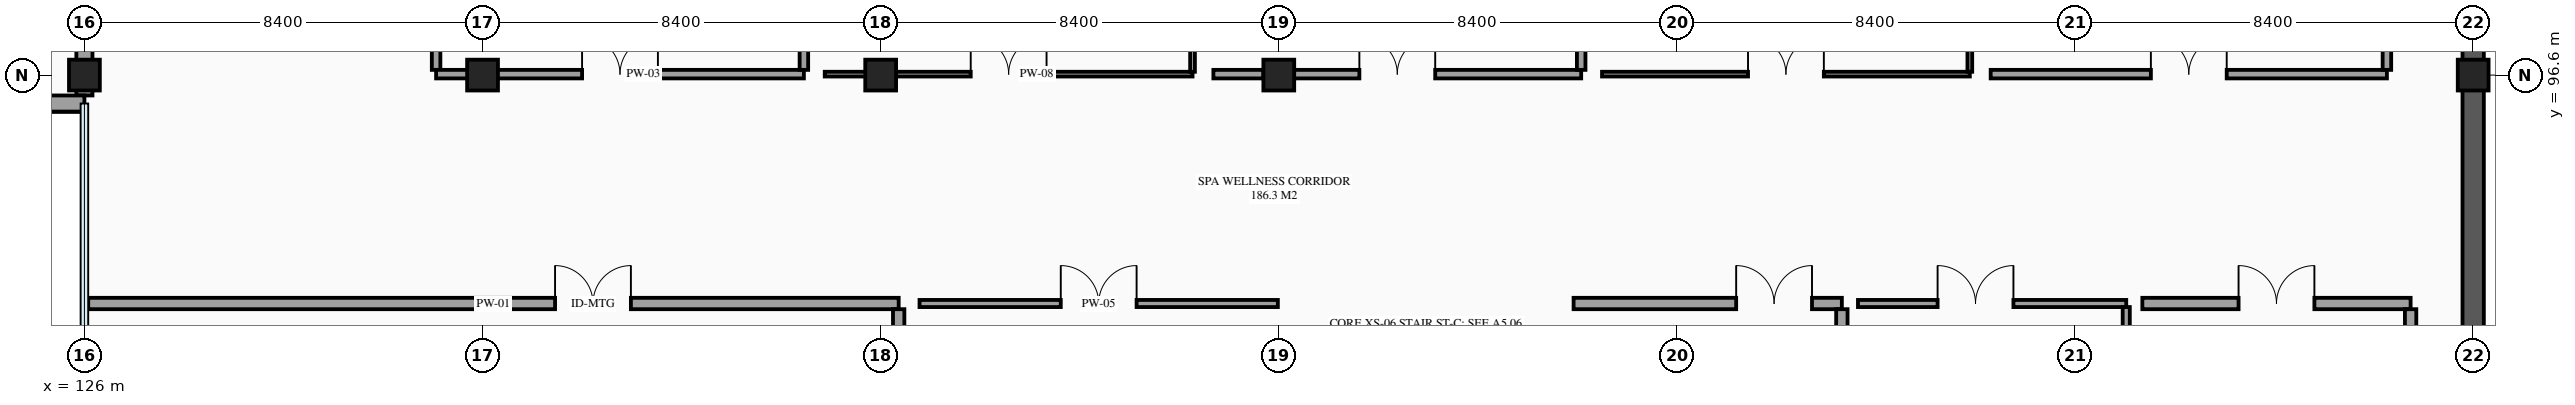
"""IFC4 building model, lengths in metres.
Left out: names, types, materials, properties, quantities, classifications, styles, units other than length and angle.
Written with IfcOpenShell. Run it as: python <this file> out.ifc"""

import sys

from ifc_helpers import new_model, si_unit, direction, frame, frame_2d, origin, origin_2d, place, context, subcontext, project, spatial, rectangle, extrude, element, fill, save


model = new_model("IFC4")
c1 = context("Model", 3, precision=1e-05, world=origin(), true_north=direction((0.0, 1.0)))
c2 = subcontext(c1, "Body", "Model", "MODEL_VIEW")
j1 = project(units=[si_unit("LENGTHUNIT", "METRE"), si_unit("PLANEANGLEUNIT", "RADIAN")], contexts=[c1])
p1 = place(None, origin())
s1 = spatial("IfcSite", under=j1, at=p1, CompositionType="ELEMENT")
p2 = place(p1, origin())
s2 = spatial("IfcBuilding", under=s1, at=p2, CompositionType="ELEMENT")
p3 = place(p2, frame((0.0, 0.0, 5.4)))
s3 = spatial("IfcBuildingStorey", under=s2, at=p3, CompositionType="ELEMENT", Elevation=5.4)
for number, where, z_axis, x_axis in (
    (1, (126.0, 96.6, 0.0), (0.0, 0.0, 1.0), (1.0, 0.0, 0.0)),
    (2, (134.4, 96.6, 0.0), (0.0, 0.0, 1.0), (1.0, 0.0, 0.0)),
    (3, (142.8, 96.6, 0.0), (0.0, 0.0, 1.0), (1.0, 0.0, 0.0)),
    (4, (151.2, 96.6, 0.0), (0.0, 0.0, 1.0), (1.0, 0.0, 0.0)),
    (5, (176.4, 96.6, 0.0), (0.0, 0.0, 1.0), (1.0, 0.0, 0.0)),
):
    element("IfcColumn", number, at=place(p3, frame(where, z_axis=z_axis, x_axis=x_axis)), inside=s3, PredefinedType="COLUMN", context=c2, shape_type="SweptSolid", body=[
        extrude(rectangle(XDim=0.65, YDim=0.65, at=origin_2d()), origin(), (0.0, 0.0, 1.0), 4.5),
    ])
p4 = place(p3, frame((176.4, 88.2, 0.0), z_axis=(0.0, 0.0, 1.0), x_axis=(0.0, 1.0, 0.0)))
e6 = element("IfcWall", 6, at=p4, inside=s3, PredefinedType="STANDARD", context=c2, shape_type="SweptSolid", body=[
    extrude(rectangle(XDim=8.4, YDim=0.45, at=frame_2d((4.2, 0.0))), origin(), (0.0, 0.0, 1.0), 4.5),
])
p5 = place(p3, frame((176.4, 96.6, 0.0), z_axis=(0.0, 0.0, 1.0), x_axis=(0.0, 1.0, 0.0)))
e7 = element("IfcWall", 7, at=p5, inside=s3, PredefinedType="STANDARD", context=c2, shape_type="SweptSolid", body=[
    extrude(rectangle(XDim=8.4, YDim=0.45, at=frame_2d((4.2, 0.0))), origin(), (0.0, 0.0, 1.0), 4.5),
])
p6 = place(p3, frame((126.0, 96.6, 0.0), z_axis=(0.0, 0.0, 1.0), x_axis=(0.0, -1.0, 0.0)))
e8 = element("IfcWall", 8, at=p6, inside=s3, PredefinedType="STANDARD", context=c2, shape_type="SweptSolid", body=[
    extrude(rectangle(XDim=0.43, YDim=0.34, at=frame_2d((0.215, 0.0))), origin(), (0.0, 0.0, 1.0), 4.5),
])
p7 = place(p3, frame((126.0, 97.2, 0.0), z_axis=(0.0, 0.0, 1.0), x_axis=(0.0, -1.0, 0.0)))
e9 = element("IfcWall", 9, at=p7, inside=s3, PredefinedType="STANDARD", context=c2, shape_type="SweptSolid", body=[
    extrude(rectangle(XDim=0.6, YDim=0.34, at=frame_2d((0.3, 0.0))), origin(), (0.0, 0.0, 1.0), 4.5),
])
p8 = place(p3, frame((58.8, 96.0, 0.0), z_axis=(0.0, 0.0, 1.0), x_axis=(1.0, 0.0, 0.0)))
e10 = element("IfcWall", 10, at=p8, inside=s3, PredefinedType="STANDARD", context=c2, shape_type="SweptSolid", body=[
    extrude(rectangle(XDim=67.2, YDim=0.34, at=frame_2d((33.6, 0.0))), origin(), (0.0, 0.0, 1.0), 4.5),
])
p9 = place(p3, frame((126.08, 91.78, 0.0), z_axis=(0.0, 0.0, 1.0), x_axis=(1.0, 0.0, 0.0)))
e11 = element("IfcWall", 11, at=p9, inside=s3, PredefinedType="PARTITIONING", context=c2, shape_type="SweptSolid", body=[
    extrude(rectangle(XDim=17.1, YDim=0.24, at=frame_2d((8.55, 0.0))), origin(), (0.0, 0.0, 1.0), 4.235),
])
p10 = place(p9, frame((9.85, 0.0, 0.0)))
e12 = element("IfcOpeningElement", 12, at=p10, cuts=e11, PredefinedType="OPENING", context=c2, shape_type="SweptSolid", body=[
    extrude(rectangle(XDim=1.6, YDim=2.25, at=frame_2d((0.8, 1.125))), frame((0.0, 0.13, 0.0), z_axis=(0.0, -1.0, 0.0), x_axis=(1.0, 0.0, 0.0)), (0.0, 0.0, 1.0), 0.26),
])
p11 = place(p3, frame((143.18, 80.42, 0.0), z_axis=(0.0, 0.0, 1.0), x_axis=(0.0, 1.0, 0.0)))
e13 = element("IfcWall", 13, at=p11, inside=s3, PredefinedType="PARTITIONING", context=c2, shape_type="SweptSolid", body=[
    extrude(rectangle(XDim=11.24, YDim=0.24, at=frame_2d((5.62, 0.0))), origin(), (0.0, 0.0, 1.0), 4.235),
])
p12 = place(p3, frame((134.4, 96.62, 0.0), z_axis=(0.0, 0.0, 1.0), x_axis=(1.0, 0.0, 0.0)))
e14 = element("IfcWall", 14, at=p12, inside=s3, PredefinedType="PARTITIONING", context=c2, shape_type="SweptSolid", body=[
    extrude(rectangle(XDim=6.78, YDim=0.18, at=frame_2d((3.39, 0.0))), origin(), (0.0, 0.0, 1.0), 3.83),
])
p13 = place(p12, frame((2.1, 0.0, 0.0)))
e15 = element("IfcOpeningElement", 15, at=p13, cuts=e14, PredefinedType="OPENING", context=c2, shape_type="SweptSolid", body=[
    extrude(rectangle(XDim=1.6, YDim=2.25, at=frame_2d((0.8, 1.125))), frame((0.0, 0.1, 0.0), z_axis=(0.0, -1.0, 0.0), x_axis=(1.0, 0.0, 0.0)), (0.0, 0.0, 1.0), 0.2),
])
for number, where, z_axis, x_axis in (
    (16, (133.42, 96.71, 0.0), (0.0, 0.0, 1.0), (0.0, 1.0, 0.0)),
    (17, (141.18, 96.71, 0.0), (0.0, 0.0, 1.0), (0.0, 1.0, 0.0)),
):
    element("IfcWall", number, at=place(p3, frame(where, z_axis=z_axis, x_axis=x_axis)), inside=s3, PredefinedType="PARTITIONING", context=c2, shape_type="SweptSolid", body=[
        extrude(rectangle(XDim=14.47, YDim=0.18, at=frame_2d((7.235, 0.0))), origin(), (0.0, 0.0, 1.0), 4.235),
    ])
p14 = place(p3, frame((143.62, 91.78, 0.0), z_axis=(0.0, 0.0, 1.0), x_axis=(1.0, 0.0, 0.0)))
e18 = element("IfcWall", 18, at=p14, inside=s3, PredefinedType="PARTITIONING", context=c2, shape_type="SweptSolid", body=[
    extrude(rectangle(XDim=7.56, YDim=0.15, at=frame_2d((3.78, 0.0))), origin(), (0.0, 0.0, 1.0), 4.235),
])
p15 = place(p14, frame((2.98, 0.0, 0.0)))
e19 = element("IfcOpeningElement", 19, at=p15, cuts=e18, PredefinedType="OPENING", context=c2, shape_type="SweptSolid", body=[
    extrude(rectangle(XDim=1.6, YDim=2.25, at=frame_2d((0.8, 1.125))), frame((0.0, 0.085, 0.0), z_axis=(0.0, -1.0, 0.0), x_axis=(1.0, 0.0, 0.0)), (0.0, 0.0, 1.0), 0.17),
])
p16 = place(p3, frame((142.8, 96.62, 0.0), z_axis=(0.0, 0.0, 1.0), x_axis=(1.0, 0.0, 0.0)))
e20 = element("IfcWall", 20, at=p16, inside=s3, PredefinedType="PARTITIONING", context=c2, shape_type="SweptSolid", body=[
    extrude(rectangle(XDim=6.58, YDim=0.1, at=frame_2d((3.29, 0.0))), origin(), (0.0, 0.0, 1.0), 3.44),
])
p17 = place(p16, frame((1.9, 0.0, 0.0)))
e21 = element("IfcOpeningElement", 21, at=p17, cuts=e20, PredefinedType="OPENING", context=c2, shape_type="SweptSolid", body=[
    extrude(rectangle(XDim=1.6, YDim=2.25, at=frame_2d((0.8, 1.125))), frame((0.0, 0.06, 0.0), z_axis=(0.0, -1.0, 0.0), x_axis=(1.0, 0.0, 0.0)), (0.0, 0.0, 1.0), 0.12),
])
p18 = place(p3, frame((149.38, 96.67, 0.0), z_axis=(0.0, 0.0, 1.0), x_axis=(0.0, 1.0, 0.0)))
e22 = element("IfcWall", 22, at=p18, inside=s3, PredefinedType="PARTITIONING", context=c2, shape_type="SweptSolid", body=[
    extrude(rectangle(XDim=14.51, YDim=0.1, at=frame_2d((7.255, 0.0))), origin(), (0.0, 0.0, 1.0), 4.235),
])
p19 = place(p3, frame((157.42, 91.78, 0.0), z_axis=(0.0, 0.0, 1.0), x_axis=(1.0, 0.0, 0.0)))
e23 = element("IfcWall", 23, at=p19, inside=s3, PredefinedType="PARTITIONING", context=c2, shape_type="SweptSolid", body=[
    extrude(rectangle(XDim=5.66, YDim=0.24, at=frame_2d((2.83, 0.0))), origin(), (0.0, 0.0, 1.0), 4.235),
])
p20 = place(p19, frame((3.43, 0.0, 0.0)))
e24 = element("IfcOpeningElement", 24, at=p20, cuts=e23, PredefinedType="OPENING", context=c2, shape_type="SweptSolid", body=[
    extrude(rectangle(XDim=1.6, YDim=2.25, at=frame_2d((0.8, 1.125))), frame((0.0, 0.13, 0.0), z_axis=(0.0, -1.0, 0.0), x_axis=(1.0, 0.0, 0.0)), (0.0, 0.0, 1.0), 0.26),
])
p21 = place(p3, frame((163.08, 80.42, 0.0), z_axis=(0.0, 0.0, 1.0), x_axis=(0.0, 1.0, 0.0)))
e25 = element("IfcWall", 25, at=p21, inside=s3, PredefinedType="PARTITIONING", context=c2, shape_type="SweptSolid", body=[
    extrude(rectangle(XDim=11.24, YDim=0.24, at=frame_2d((5.62, 0.0))), origin(), (0.0, 0.0, 1.0), 4.235),
])
p22 = place(p3, frame((150.875, 96.62, 0.0), z_axis=(0.0, 0.0, 1.0), x_axis=(1.0, 0.0, 0.0)))
e26 = element("IfcWall", 26, at=p22, inside=s3, PredefinedType="PARTITIONING", context=c2, shape_type="SweptSolid", body=[
    extrude(rectangle(XDim=6.705, YDim=0.18, at=frame_2d((3.353, 0.0))), origin(), (0.0, 0.0, 1.0), 4.235),
])
p23 = place(p22, frame((2.025, 0.0, 0.0)))
e27 = element("IfcOpeningElement", 27, at=p23, cuts=e26, PredefinedType="OPENING", context=c2, shape_type="SweptSolid", body=[
    extrude(rectangle(XDim=1.6, YDim=2.25, at=frame_2d((0.8, 1.125))), frame((0.0, 0.1, 0.0), z_axis=(0.0, -1.0, 0.0), x_axis=(1.0, 0.0, 0.0)), (0.0, 0.0, 1.0), 0.2),
])
p24 = place(p3, frame((157.58, 96.71, 0.0), z_axis=(0.0, 0.0, 1.0), x_axis=(0.0, 1.0, 0.0)))
e28 = element("IfcWall", 28, at=p24, inside=s3, PredefinedType="PARTITIONING", context=c2, shape_type="SweptSolid", body=[
    extrude(rectangle(XDim=14.47, YDim=0.18, at=frame_2d((7.235, 0.0))), origin(), (0.0, 0.0, 1.0), 4.235),
])
p25 = place(p3, frame((163.42, 91.78, 0.0), z_axis=(0.0, 0.0, 1.0), x_axis=(1.0, 0.0, 0.0)))
e29 = element("IfcWall", 29, at=p25, inside=s3, PredefinedType="PARTITIONING", context=c2, shape_type="SweptSolid", body=[
    extrude(rectangle(XDim=5.66, YDim=0.15, at=frame_2d((2.83, 0.0))), origin(), (0.0, 0.0, 1.0), 4.235),
])
p26 = place(p25, frame((1.68, 0.0, 0.0)))
e30 = element("IfcOpeningElement", 30, at=p26, cuts=e29, PredefinedType="OPENING", context=c2, shape_type="SweptSolid", body=[
    extrude(rectangle(XDim=1.6, YDim=2.25, at=frame_2d((0.8, 1.125))), frame((0.0, 0.085, 0.0), z_axis=(0.0, -1.0, 0.0), x_axis=(1.0, 0.0, 0.0)), (0.0, 0.0, 1.0), 0.17),
])
p27 = place(p3, frame((169.08, 80.42, 0.0), z_axis=(0.0, 0.0, 1.0), x_axis=(0.0, 1.0, 0.0)))
e31 = element("IfcWall", 31, at=p27, inside=s3, PredefinedType="PARTITIONING", context=c2, shape_type="SweptSolid", body=[
    extrude(rectangle(XDim=11.285, YDim=0.15, at=frame_2d((5.643, 0.0))), origin(), (0.0, 0.0, 1.0), 4.235),
])
p28 = place(p3, frame((158.02, 96.62, 0.0), z_axis=(0.0, 0.0, 1.0), x_axis=(1.0, 0.0, 0.0)))
e32 = element("IfcWall", 32, at=p28, inside=s3, PredefinedType="PARTITIONING", context=c2, shape_type="SweptSolid", body=[
    extrude(rectangle(XDim=7.76, YDim=0.1, at=frame_2d((3.88, 0.0))), origin(), (0.0, 0.0, 1.0), 4.235),
])
p29 = place(p28, frame((3.08, 0.0, 0.0)))
e33 = element("IfcOpeningElement", 33, at=p29, cuts=e32, PredefinedType="OPENING", context=c2, shape_type="SweptSolid", body=[
    extrude(rectangle(XDim=1.6, YDim=2.25, at=frame_2d((0.8, 1.125))), frame((0.0, 0.06, 0.0), z_axis=(0.0, -1.0, 0.0), x_axis=(1.0, 0.0, 0.0)), (0.0, 0.0, 1.0), 0.12),
])
p30 = place(p3, frame((165.78, 96.67, 0.0), z_axis=(0.0, 0.0, 1.0), x_axis=(0.0, 1.0, 0.0)))
e34 = element("IfcWall", 34, at=p30, inside=s3, PredefinedType="PARTITIONING", context=c2, shape_type="SweptSolid", body=[
    extrude(rectangle(XDim=14.51, YDim=0.1, at=frame_2d((7.255, 0.0))), origin(), (0.0, 0.0, 1.0), 4.235),
])
p31 = place(p3, frame((169.42, 91.78, 0.0), z_axis=(0.0, 0.0, 1.0), x_axis=(1.0, 0.0, 0.0)))
e35 = element("IfcWall", 35, at=p31, inside=s3, PredefinedType="PARTITIONING", context=c2, shape_type="SweptSolid", body=[
    extrude(rectangle(XDim=5.66, YDim=0.24, at=frame_2d((2.83, 0.0))), origin(), (0.0, 0.0, 1.0), 4.235),
])
p32 = place(p31, frame((2.03, 0.0, 0.0)))
e36 = element("IfcOpeningElement", 36, at=p32, cuts=e35, PredefinedType="OPENING", context=c2, shape_type="SweptSolid", body=[
    extrude(rectangle(XDim=1.6, YDim=2.25, at=frame_2d((0.8, 1.125))), frame((0.0, 0.13, 0.0), z_axis=(0.0, -1.0, 0.0), x_axis=(1.0, 0.0, 0.0)), (0.0, 0.0, 1.0), 0.26),
])
p33 = place(p3, frame((175.08, 80.42, 0.0), z_axis=(0.0, 0.0, 1.0), x_axis=(0.0, 1.0, 0.0)))
e37 = element("IfcWall", 37, at=p33, inside=s3, PredefinedType="PARTITIONING", context=c2, shape_type="SweptSolid", body=[
    extrude(rectangle(XDim=11.24, YDim=0.24, at=frame_2d((5.62, 0.0))), origin(), (0.0, 0.0, 1.0), 4.235),
])
p34 = place(p3, frame((166.22, 96.62, 0.0), z_axis=(0.0, 0.0, 1.0), x_axis=(1.0, 0.0, 0.0)))
e38 = element("IfcWall", 38, at=p34, inside=s3, PredefinedType="PARTITIONING", context=c2, shape_type="SweptSolid", body=[
    extrude(rectangle(XDim=8.36, YDim=0.18, at=frame_2d((4.18, 0.0))), origin(), (0.0, 0.0, 1.0), 4.235),
])
p35 = place(p34, frame((3.38, 0.0, 0.0)))
e39 = element("IfcOpeningElement", 39, at=p35, cuts=e38, PredefinedType="OPENING", context=c2, shape_type="SweptSolid", body=[
    extrude(rectangle(XDim=1.6, YDim=2.25, at=frame_2d((0.8, 1.125))), frame((0.0, 0.1, 0.0), z_axis=(0.0, -1.0, 0.0), x_axis=(1.0, 0.0, 0.0)), (0.0, 0.0, 1.0), 0.2),
])
p36 = place(p3, frame((174.58, 96.71, 0.0), z_axis=(0.0, 0.0, 1.0), x_axis=(0.0, 1.0, 0.0)))
e40 = element("IfcWall", 40, at=p36, inside=s3, PredefinedType="PARTITIONING", context=c2, shape_type="SweptSolid", body=[
    extrude(rectangle(XDim=14.47, YDim=0.18, at=frame_2d((7.235, 0.0))), origin(), (0.0, 0.0, 1.0), 4.235),
])
p37 = place(p3, frame((133.42, 96.62, 0.0), z_axis=(0.0, 0.0, 1.0), x_axis=(1.0, 0.0, 0.0)))
e41 = element("IfcWall", 41, at=p37, inside=s3, PredefinedType="PARTITIONING", context=c2, shape_type="SweptSolid", body=[
    extrude(rectangle(XDim=0.98, YDim=0.18, at=frame_2d((0.49, 0.0))), origin(), (0.0, 0.0, 1.0), 3.39),
])
p38 = place(p3, frame((141.62, 96.62, 0.0), z_axis=(0.0, 0.0, 1.0), x_axis=(1.0, 0.0, 0.0)))
e42 = element("IfcWall", 42, at=p38, inside=s3, PredefinedType="PARTITIONING", context=c2, shape_type="SweptSolid", body=[
    extrude(rectangle(XDim=1.18, YDim=0.1, at=frame_2d((0.59, 0.0))), origin(), (0.0, 0.0, 1.0), 3.83),
])
p39 = place(p3, frame((149.82, 96.62, 0.0), z_axis=(0.0, 0.0, 1.0), x_axis=(1.0, 0.0, 0.0)))
e43 = element("IfcWall", 43, at=p39, inside=s3, PredefinedType="PARTITIONING", context=c2, shape_type="SweptSolid", body=[
    extrude(rectangle(XDim=1.055, YDim=0.18, at=frame_2d((0.527, 0.0))), origin(), (0.0, 0.0, 1.0), 3.44),
])
p40 = place(p10, origin())
e44 = element("IfcDoor", 44, at=p40, inside=s3, OperationType="DOUBLE_DOOR_SINGLE_SWING", PredefinedType="DOOR", context=c2, shape_type="SweptSolid", body=[
    extrude(rectangle(XDim=1.6, YDim=2.25, at=frame_2d((0.8, 1.125))), frame((0.0, 0.025, 0.0), z_axis=(0.0, -1.0, 0.0), x_axis=(1.0, 0.0, 0.0)), (0.0, 0.0, 1.0), 0.05),
])
fill(e12, e44)
p41 = place(p13, origin())
e45 = element("IfcDoor", 45, at=p41, inside=s3, OperationType="DOUBLE_DOOR_SINGLE_SWING", PredefinedType="DOOR", context=c2, shape_type="SweptSolid", body=[
    extrude(rectangle(XDim=1.6, YDim=2.25, at=frame_2d((0.8, 1.125))), frame((0.0, 0.025, 0.0), z_axis=(0.0, -1.0, 0.0), x_axis=(1.0, 0.0, 0.0)), (0.0, 0.0, 1.0), 0.05),
])
fill(e15, e45)
p42 = place(p15, origin())
e46 = element("IfcDoor", 46, at=p42, inside=s3, OperationType="DOUBLE_DOOR_SINGLE_SWING", PredefinedType="DOOR", context=c2, shape_type="SweptSolid", body=[
    extrude(rectangle(XDim=1.6, YDim=2.25, at=frame_2d((0.8, 1.125))), frame((0.0, 0.025, 0.0), z_axis=(0.0, -1.0, 0.0), x_axis=(1.0, 0.0, 0.0)), (0.0, 0.0, 1.0), 0.05),
])
fill(e19, e46)
p43 = place(p17, origin())
e47 = element("IfcDoor", 47, at=p43, inside=s3, OperationType="DOUBLE_DOOR_SINGLE_SWING", PredefinedType="DOOR", context=c2, shape_type="SweptSolid", body=[
    extrude(rectangle(XDim=1.6, YDim=2.25, at=frame_2d((0.8, 1.125))), frame((0.0, 0.025, 0.0), z_axis=(0.0, -1.0, 0.0), x_axis=(1.0, 0.0, 0.0)), (0.0, 0.0, 1.0), 0.05),
])
fill(e21, e47)
p44 = place(p20, origin())
e48 = element("IfcDoor", 48, at=p44, inside=s3, OperationType="DOUBLE_DOOR_SINGLE_SWING", PredefinedType="DOOR", context=c2, shape_type="SweptSolid", body=[
    extrude(rectangle(XDim=1.6, YDim=2.25, at=frame_2d((0.8, 1.125))), frame((0.0, 0.025, 0.0), z_axis=(0.0, -1.0, 0.0), x_axis=(1.0, 0.0, 0.0)), (0.0, 0.0, 1.0), 0.05),
])
fill(e24, e48)
p45 = place(p23, origin())
e49 = element("IfcDoor", 49, at=p45, inside=s3, OperationType="DOUBLE_DOOR_SINGLE_SWING", PredefinedType="DOOR", context=c2, shape_type="SweptSolid", body=[
    extrude(rectangle(XDim=1.6, YDim=2.25, at=frame_2d((0.8, 1.125))), frame((0.0, 0.025, 0.0), z_axis=(0.0, -1.0, 0.0), x_axis=(1.0, 0.0, 0.0)), (0.0, 0.0, 1.0), 0.05),
])
fill(e27, e49)
p46 = place(p26, origin())
e50 = element("IfcDoor", 50, at=p46, inside=s3, OperationType="DOUBLE_DOOR_SINGLE_SWING", PredefinedType="DOOR", context=c2, shape_type="SweptSolid", body=[
    extrude(rectangle(XDim=1.6, YDim=2.25, at=frame_2d((0.8, 1.125))), frame((0.0, 0.025, 0.0), z_axis=(0.0, -1.0, 0.0), x_axis=(1.0, 0.0, 0.0)), (0.0, 0.0, 1.0), 0.05),
])
fill(e30, e50)
p47 = place(p29, origin())
e51 = element("IfcDoor", 51, at=p47, inside=s3, OperationType="DOUBLE_DOOR_SINGLE_SWING", PredefinedType="DOOR", context=c2, shape_type="SweptSolid", body=[
    extrude(rectangle(XDim=1.6, YDim=2.25, at=frame_2d((0.8, 1.125))), frame((0.0, 0.025, 0.0), z_axis=(0.0, -1.0, 0.0), x_axis=(1.0, 0.0, 0.0)), (0.0, 0.0, 1.0), 0.05),
])
fill(e33, e51)
p48 = place(p32, origin())
e52 = element("IfcDoor", 52, at=p48, inside=s3, OperationType="DOUBLE_DOOR_SINGLE_SWING", PredefinedType="DOOR", context=c2, shape_type="SweptSolid", body=[
    extrude(rectangle(XDim=1.6, YDim=2.25, at=frame_2d((0.8, 1.125))), frame((0.0, 0.025, 0.0), z_axis=(0.0, -1.0, 0.0), x_axis=(1.0, 0.0, 0.0)), (0.0, 0.0, 1.0), 0.05),
])
fill(e36, e52)
p49 = place(p35, origin())
e53 = element("IfcDoor", 53, at=p49, inside=s3, OperationType="DOUBLE_DOOR_SINGLE_SWING", PredefinedType="DOOR", context=c2, shape_type="SweptSolid", body=[
    extrude(rectangle(XDim=1.6, YDim=2.25, at=frame_2d((0.8, 1.125))), frame((0.0, 0.025, 0.0), z_axis=(0.0, -1.0, 0.0), x_axis=(1.0, 0.0, 0.0)), (0.0, 0.0, 1.0), 0.05),
])
fill(e39, e53)
save(model, sys.argv[1])
